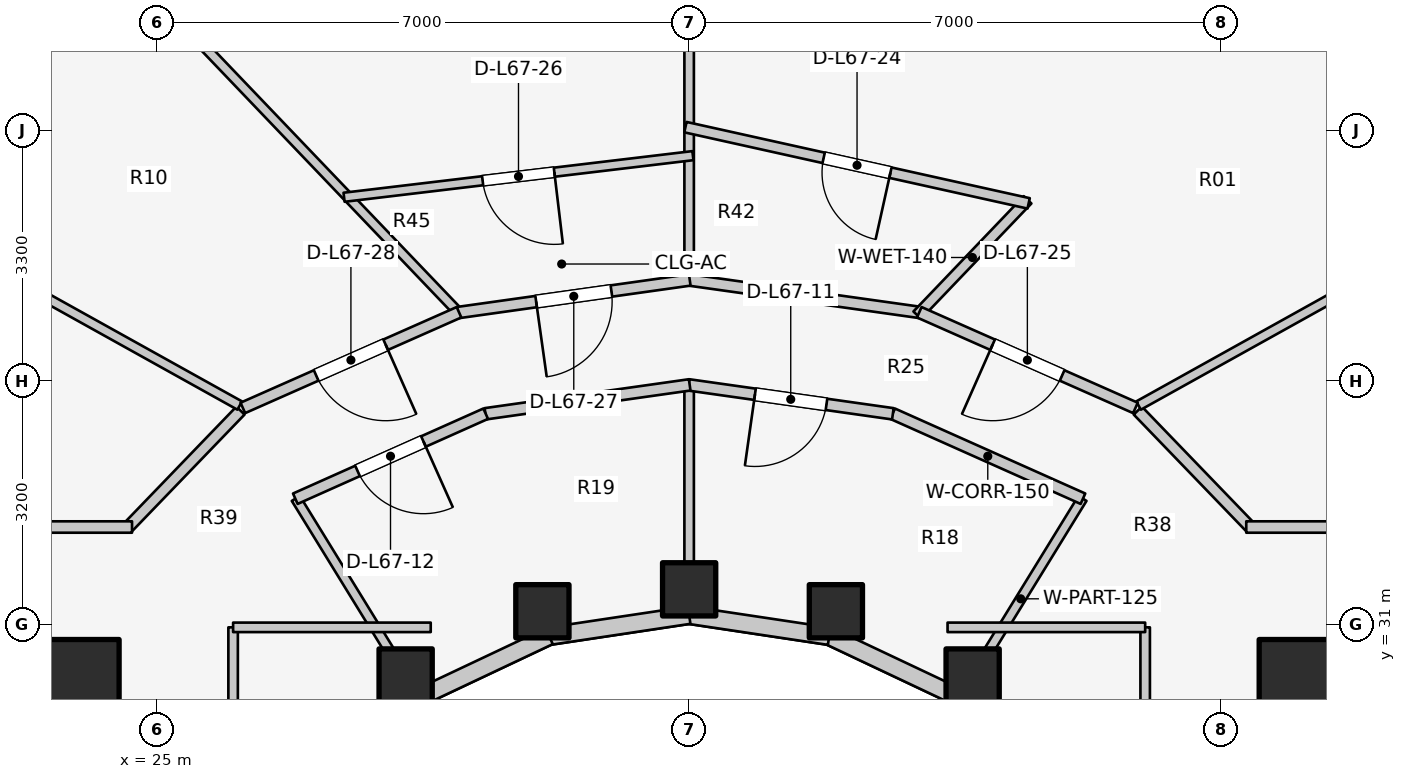
"""IFC4 building model, lengths in metres.
Left out: names, types, materials, properties, quantities, classifications, styles, units other than length and angle.
Written with IfcOpenShell. Run it as: python <this file> out.ifc"""

import sys

from ifc_helpers import new_model, si_unit, direction, frame, frame_2d, origin, origin_2d, place, context, subcontext, project, spatial, rectangle, extrude, element, fill, save


model = new_model("IFC4")
c1 = context("Model", 3, precision=1e-05, world=origin(), true_north=direction((0.0, 1.0)))
c2 = subcontext(c1, "Body", "Model", "MODEL_VIEW")
j1 = project(units=[si_unit("LENGTHUNIT", "METRE"), si_unit("PLANEANGLEUNIT", "RADIAN")], contexts=[c1])
p1 = place(None, origin())
s1 = spatial("IfcSite", under=j1, at=p1, CompositionType="ELEMENT")
p2 = place(p1, origin())
s2 = spatial("IfcBuilding", under=s1, at=p2, CompositionType="ELEMENT")
p3 = place(p2, frame((0.0, 0.0, 220.2)))
s3 = spatial("IfcBuildingStorey", under=s2, at=p3, CompositionType="ELEMENT", Elevation=220.2)
for number, where, z_axis, x_axis in (
    (1, (19.65, 30.35, 0.0), (0.0, 0.0, 1.0), (1.0, 0.0, 0.0)),
    (2, (39.85, 30.35, 0.0), (0.0, 0.0, 1.0), (1.0, 0.0, 0.0)),
):
    element("IfcWall", number, at=place(p3, frame(where, z_axis=z_axis, x_axis=x_axis)), inside=s3, PredefinedType="SHEAR", context=c2, shape_type="SweptSolid", body=[
        extrude(rectangle(XDim=4.5, YDim=0.55, at=frame_2d((2.25, 0.0))), origin(), (0.0, 0.0, 1.0), 3.1),
    ])
for number, where, z_axis, x_axis in (
    (3, (23.9, 30.2, 0.0), (0.0, 0.0, 1.0), (1.0, 0.0, 0.0)),
    (4, (40.1, 30.2, 0.0), (0.0, 0.0, 1.0), (1.0, 0.0, 0.0)),
):
    element("IfcColumn", number, at=place(p3, frame(where, z_axis=z_axis, x_axis=x_axis)), inside=s3, PredefinedType="COLUMN", context=c2, shape_type="SweptSolid", body=[
        extrude(rectangle(XDim=1.2, YDim=1.2, at=origin_2d()), origin(), (0.0, 0.0, 1.0), 3.1),
    ])
for number, where, z_axis, x_axis in (
    (5, (35.73, 30.327, 0.0), (0.0, 0.0, 1.0), (1.0, 0.0, 0.0)),
    (6, (33.931, 31.172, 0.0), (0.0, 0.0, 1.0), (1.0, 0.0, 0.0)),
    (7, (32.0, 31.46, 0.0), (0.0, 0.0, 1.0), (1.0, 0.0, 0.0)),
    (8, (30.069, 31.172, 0.0), (0.0, 0.0, 1.0), (1.0, 0.0, 0.0)),
    (9, (28.27, 30.327, 0.0), (0.0, 0.0, 1.0), (1.0, 0.0, 0.0)),
):
    element("IfcColumn", number, at=place(p3, frame(where, z_axis=z_axis, x_axis=x_axis)), inside=s3, PredefinedType="COLUMN", context=c2, shape_type="SweptSolid", body=[
        extrude(rectangle(XDim=0.7, YDim=0.7, at=origin_2d()), origin(), (0.0, 0.0, 1.0), 3.1),
    ])
p4 = place(p3, frame((37.035, 28.742, 0.0), z_axis=(0.0, 0.0, 1.0), x_axis=(-0.752576694707, 0.658504607869, 0.0)))
e10 = element("IfcWall", 10, at=p4, inside=s3, PredefinedType="STANDARD", context=c2, shape_type="SweptSolid", body=[
    extrude(rectangle(XDim=1.959, YDim=0.23, at=frame_2d((0.98, 0.0))), origin(), (0.0, 0.0, 1.0), 2.16),
])
p5 = place(p3, frame((35.56, 30.032, 0.0), z_axis=(0.0, 0.0, 1.0), x_axis=(-0.904179699603, 0.427152280606, 0.0)))
e11 = element("IfcWall", 11, at=p5, inside=s3, PredefinedType="STANDARD", context=c2, shape_type="SweptSolid", body=[
    extrude(rectangle(XDim=1.899, YDim=0.23, at=frame_2d((0.95, 0.0))), origin(), (0.0, 0.0, 1.0), 2.16),
])
for number, where, z_axis, x_axis in (
    (12, (33.843, 30.843, 0.0), (0.0, 0.0, 1.0), (-0.989, 0.149, 0.0)),
    (13, (32.0, 31.12, 0.0), (0.0, 0.0, 1.0), (-0.989, -0.149, 0.0)),
):
    element("IfcWall", number, at=place(p3, frame(where, z_axis=z_axis, x_axis=x_axis)), inside=s3, PredefinedType="STANDARD", context=c2, shape_type="SweptSolid", body=[
        extrude(rectangle(XDim=1.864, YDim=0.23, at=frame_2d((0.932, 0.0))), origin(), (0.0, 0.0, 1.0), 2.16),
    ])
p6 = place(p3, frame((30.157, 30.843, 0.0), z_axis=(0.0, 0.0, 1.0), x_axis=(-0.904179699603, -0.427152280606, 0.0)))
e14 = element("IfcWall", 14, at=p6, inside=s3, PredefinedType="STANDARD", context=c2, shape_type="SweptSolid", body=[
    extrude(rectangle(XDim=1.899, YDim=0.23, at=frame_2d((0.95, 0.0))), origin(), (0.0, 0.0, 1.0), 2.16),
])
p7 = place(p3, frame((28.44, 30.032, 0.0), z_axis=(0.0, 0.0, 1.0), x_axis=(-0.752576694707, -0.658504607869, 0.0)))
e15 = element("IfcWall", 15, at=p7, inside=s3, PredefinedType="STANDARD", context=c2, shape_type="SweptSolid", body=[
    extrude(rectangle(XDim=1.959, YDim=0.23, at=frame_2d((0.98, 0.0))), origin(), (0.0, 0.0, 1.0), 2.16),
])
p8 = place(p3, frame((43.87, 37.733, 0.0), z_axis=(0.0, 0.0, 1.0), x_axis=(-0.911427484938, 0.411460738952, 0.0)))
e16 = element("IfcWall", 16, at=p8, inside=s3, PredefinedType="STANDARD", context=c2, shape_type="SweptSolid", body=[
    extrude(rectangle(XDim=5.296, YDim=0.26, at=frame_2d((2.648, 0.0))), origin(), (0.0, 0.0, 1.0), 2.85),
])
p9 = place(p8, frame((1.898, 0.0, 0.75)))
e17 = element("IfcOpeningElement", 17, at=p9, cuts=e16, PredefinedType="OPENING", context=c2, shape_type="SweptSolid", body=[
    extrude(rectangle(XDim=1.5, YDim=1.6, at=frame_2d((0.75, 0.8))), frame((0.0, 0.14, 0.0), z_axis=(0.0, -1.0, 0.0), x_axis=(1.0, 0.0, 0.0)), (0.0, 0.0, 1.0), 0.28),
])
p10 = place(p3, frame((24.957, 39.912, 0.0), z_axis=(0.0, 0.0, 1.0), x_axis=(-0.911427484938, -0.411460738952, 0.0)))
e18 = element("IfcWall", 18, at=p10, inside=s3, PredefinedType="STANDARD", context=c2, shape_type="SweptSolid", body=[
    extrude(rectangle(XDim=5.296, YDim=0.26, at=frame_2d((2.648, 0.0))), origin(), (0.0, 0.0, 1.0), 2.85),
])
p11 = place(p10, frame((1.898, 0.0, 0.75)))
e19 = element("IfcOpeningElement", 19, at=p11, cuts=e18, PredefinedType="OPENING", context=c2, shape_type="SweptSolid", body=[
    extrude(rectangle(XDim=1.5, YDim=1.6, at=frame_2d((0.75, 0.8))), frame((0.0, 0.14, 0.0), z_axis=(0.0, -1.0, 0.0), x_axis=(1.0, 0.0, 0.0)), (0.0, 0.0, 1.0), 0.28),
])
p12 = place(p3, frame((35.55, 30.015, 0.0), z_axis=(0.0, 0.0, 1.0), x_axis=(0.523992004803, 0.851723182086, 0.0)))
e20 = element("IfcWall", 20, at=p12, inside=s3, PredefinedType="PARTITIONING", context=c2, shape_type="SweptSolid", body=[
    extrude(rectangle(XDim=3.101, YDim=0.125, at=frame_2d((1.551, 0.0))), origin(), (0.0, 0.0, 1.0), 2.376),
])
p13 = place(p3, frame((32.0, 31.1, 0.0), z_axis=(0.0, 0.0, 1.0), x_axis=(0.0, 1.0, 0.0)))
e21 = element("IfcWall", 21, at=p13, inside=s3, PredefinedType="PARTITIONING", context=c2, shape_type="SweptSolid", body=[
    extrude(rectangle(XDim=3.05, YDim=0.125, at=frame_2d((1.525, 0.0))), origin(), (0.0, 0.0, 1.0), 2.376),
])
p14 = place(p3, frame((28.45, 30.015, 0.0), z_axis=(0.0, 0.0, 1.0), x_axis=(-0.523992004803, 0.851723182086, 0.0)))
e22 = element("IfcWall", 22, at=p14, inside=s3, PredefinedType="PARTITIONING", context=c2, shape_type="SweptSolid", body=[
    extrude(rectangle(XDim=3.101, YDim=0.125, at=frame_2d((1.551, 0.0))), origin(), (0.0, 0.0, 1.0), 2.376),
])
p15 = place(p3, frame((37.181, 32.652, 0.0), z_axis=(0.0, 0.0, 1.0), x_axis=(-0.913120130558, 0.407690602257, 0.0)))
e23 = element("IfcWall", 23, at=p15, inside=s3, PredefinedType="PARTITIONING", context=c2, shape_type="SweptSolid", body=[
    extrude(rectangle(XDim=2.743, YDim=0.15, at=frame_2d((1.371, 0.0))), origin(), (0.0, 0.0, 1.0), 2.376),
])
p16 = place(p3, frame((34.68, 33.77, 0.0), z_axis=(0.0, 0.0, 1.0), x_axis=(-0.990132151456, 0.140136799779, 0.0)))
e24 = element("IfcWall", 24, at=p16, inside=s3, PredefinedType="PARTITIONING", context=c2, shape_type="SweptSolid", body=[
    extrude(rectangle(XDim=2.714, YDim=0.15, at=frame_2d((1.357, 0.0))), origin(), (0.0, 0.0, 1.0), 2.376),
])
p17 = place(p16, frame((0.882, 0.0, 0.0)))
e25 = element("IfcOpeningElement", 25, at=p17, cuts=e24, PredefinedType="OPENING", context=c2, shape_type="SweptSolid", body=[
    extrude(rectangle(XDim=0.95, YDim=2.1, at=frame_2d((0.475, 1.05))), frame((0.0, 0.085, 0.0), z_axis=(0.0, -1.0, 0.0), x_axis=(1.0, 0.0, 0.0)), (0.0, 0.0, 1.0), 0.17),
])
p18 = place(p3, frame((32.007, 34.15, 0.0), z_axis=(0.0, 0.0, 1.0), x_axis=(-0.990132151456, -0.140136799779, 0.0)))
e26 = element("IfcWall", 26, at=p18, inside=s3, PredefinedType="PARTITIONING", context=c2, shape_type="SweptSolid", body=[
    extrude(rectangle(XDim=2.714, YDim=0.15, at=frame_2d((1.357, 0.0))), origin(), (0.0, 0.0, 1.0), 2.376),
])
p19 = place(p3, frame((29.323, 33.771, 0.0), z_axis=(0.0, 0.0, 1.0), x_axis=(-0.913120130558, -0.407690602257, 0.0)))
e27 = element("IfcWall", 27, at=p19, inside=s3, PredefinedType="PARTITIONING", context=c2, shape_type="SweptSolid", body=[
    extrude(rectangle(XDim=2.743, YDim=0.15, at=frame_2d((1.371, 0.0))), origin(), (0.0, 0.0, 1.0), 2.376),
])
p20 = place(p19, frame((0.896, 0.0, 0.0)))
e28 = element("IfcOpeningElement", 28, at=p20, cuts=e27, PredefinedType="OPENING", context=c2, shape_type="SweptSolid", body=[
    extrude(rectangle(XDim=0.95, YDim=2.1, at=frame_2d((0.475, 1.05))), frame((0.0, 0.085, 0.0), z_axis=(0.0, -1.0, 0.0), x_axis=(1.0, 0.0, 0.0)), (0.0, 0.0, 1.0), 0.17),
])
p21 = place(p3, frame((26.0, 25.8, 0.0), z_axis=(0.0, 0.0, 1.0), x_axis=(0.0, 1.0, 0.0)))
e29 = element("IfcWall", 29, at=p21, inside=s3, PredefinedType="PARTITIONING", context=c2, shape_type="SweptSolid", body=[
    extrude(rectangle(XDim=5.16, YDim=0.125, at=frame_2d((2.58, 0.0))), origin(), (0.0, 0.0, 1.0), 2.232),
])
p22 = place(p3, frame((26.0, 30.96, 0.0), z_axis=(0.0, 0.0, 1.0), x_axis=(1.0, 0.0, 0.0)))
e30 = element("IfcWall", 30, at=p22, inside=s3, PredefinedType="PARTITIONING", context=c2, shape_type="SweptSolid", body=[
    extrude(rectangle(XDim=2.6, YDim=0.125, at=frame_2d((1.3, 0.0))), origin(), (0.0, 0.0, 1.0), 2.376),
])
p23 = place(p3, frame((38.0, 25.8, 0.0), z_axis=(0.0, 0.0, 1.0), x_axis=(0.0, 1.0, 0.0)))
e31 = element("IfcWall", 31, at=p23, inside=s3, PredefinedType="PARTITIONING", context=c2, shape_type="SweptSolid", body=[
    extrude(rectangle(XDim=5.16, YDim=0.125, at=frame_2d((2.58, 0.0))), origin(), (0.0, 0.0, 1.0), 2.232),
])
p24 = place(p3, frame((35.4, 30.96, 0.0), z_axis=(0.0, 0.0, 1.0), x_axis=(1.0, 0.0, 0.0)))
e32 = element("IfcWall", 32, at=p24, inside=s3, PredefinedType="PARTITIONING", context=c2, shape_type="SweptSolid", body=[
    extrude(rectangle(XDim=2.6, YDim=0.125, at=frame_2d((1.3, 0.0))), origin(), (0.0, 0.0, 1.0), 2.376),
])
p25 = place(p3, frame((37.903, 33.812, 0.0), z_axis=(0.0, 0.0, 1.0), x_axis=(0.694032962553, -0.719943224768, 0.0)))
e33 = element("IfcWall", 33, at=p25, inside=s3, PredefinedType="PARTITIONING", context=c2, shape_type="SweptSolid", body=[
    extrude(rectangle(XDim=2.158, YDim=0.15, at=frame_2d((1.079, 0.0))), origin(), (0.0, 0.0, 1.0), 2.376),
])
p26 = place(p3, frame((39.33, 32.28, 0.0), z_axis=(0.0, 0.0, 1.0), x_axis=(1.0, 0.0, 0.0)))
e34 = element("IfcWall", 34, at=p26, inside=s3, PredefinedType="PARTITIONING", context=c2, shape_type="SweptSolid", body=[
    extrude(rectangle(XDim=7.52, YDim=0.15, at=frame_2d((3.76, 0.0))), origin(), (0.0, 0.0, 1.0), 2.376),
])
p27 = place(p26, frame((5.22, 0.0, 0.0)))
e35 = element("IfcOpeningElement", 35, at=p27, cuts=e34, PredefinedType="OPENING", context=c2, shape_type="SweptSolid", body=[
    extrude(rectangle(XDim=0.9, YDim=2.1, at=frame_2d((0.45, 1.05))), frame((0.0, 0.085, 0.0), z_axis=(0.0, -1.0, 0.0), x_axis=(1.0, 0.0, 0.0)), (0.0, 0.0, 1.0), 0.17),
])
p28 = place(p3, frame((26.097, 33.812, 0.0), z_axis=(0.0, 0.0, 1.0), x_axis=(-0.694032962553, -0.719943224768, 0.0)))
e36 = element("IfcWall", 36, at=p28, inside=s3, PredefinedType="PARTITIONING", context=c2, shape_type="SweptSolid", body=[
    extrude(rectangle(XDim=2.158, YDim=0.15, at=frame_2d((1.079, 0.0))), origin(), (0.0, 0.0, 1.0), 2.376),
])
p29 = place(p3, frame((17.15, 32.28, 0.0), z_axis=(0.0, 0.0, 1.0), x_axis=(1.0, 0.0, 0.0)))
e37 = element("IfcWall", 37, at=p29, inside=s3, PredefinedType="PARTITIONING", context=c2, shape_type="SweptSolid", body=[
    extrude(rectangle(XDim=7.52, YDim=0.15, at=frame_2d((3.76, 0.0))), origin(), (0.0, 0.0, 1.0), 2.376),
])
p30 = place(p29, frame((1.3, 0.0, 0.0)))
e38 = element("IfcOpeningElement", 38, at=p30, cuts=e37, PredefinedType="OPENING", context=c2, shape_type="SweptSolid", body=[
    extrude(rectangle(XDim=0.9, YDim=2.1, at=frame_2d((0.45, 1.05))), frame((0.0, 0.085, 0.0), z_axis=(0.0, -1.0, 0.0), x_axis=(1.0, 0.0, 0.0)), (0.0, 0.0, 1.0), 0.17),
])
p31 = place(p3, frame((37.913, 33.878, 0.0), z_axis=(0.0, 0.0, 1.0), x_axis=(0.87377679808, 0.486327160599, 0.0)))
e39 = element("IfcWall", 39, at=p31, inside=s3, PredefinedType="PARTITIONING", context=c2, shape_type="SweptSolid", body=[
    extrude(rectangle(XDim=6.24, YDim=0.125, at=frame_2d((3.12, 0.0))), origin(), (0.0, 0.0, 1.0), 2.376),
])
p32 = place(p3, frame((32.0, 35.585, 0.0), z_axis=(0.0, 0.0, 1.0), x_axis=(0.0, 1.0, 0.0)))
e40 = element("IfcWall", 40, at=p32, inside=s3, PredefinedType="PARTITIONING", context=c2, shape_type="SweptSolid", body=[
    extrude(rectangle(XDim=4.115, YDim=0.125, at=frame_2d((2.058, 0.0))), origin(), (0.0, 0.0, 1.0), 2.376),
])
p33 = place(p3, frame((28.926, 35.143, 0.0), z_axis=(0.0, 0.0, 1.0), x_axis=(-0.691128003726, 0.722732372642, 0.0)))
e41 = element("IfcWall", 41, at=p33, inside=s3, PredefinedType="PARTITIONING", context=c2, shape_type="SweptSolid", body=[
    extrude(rectangle(XDim=5.33, YDim=0.125, at=frame_2d((2.665, 0.0))), origin(), (0.0, 0.0, 1.0), 2.376),
])
p34 = place(p3, frame((26.087, 33.878, 0.0), z_axis=(0.0, 0.0, 1.0), x_axis=(-0.87377679808, 0.486327160599, 0.0)))
e42 = element("IfcWall", 42, at=p34, inside=s3, PredefinedType="PARTITIONING", context=c2, shape_type="SweptSolid", body=[
    extrude(rectangle(XDim=6.24, YDim=0.125, at=frame_2d((3.12, 0.0))), origin(), (0.0, 0.0, 1.0), 2.376),
])
p35 = place(p3, frame((35.085, 35.096, 0.0), z_axis=(0.0, 0.0, 1.0), x_axis=(-0.990254086283, 0.139272555084, 0.0)))
e43 = element("IfcWall", 43, at=p35, inside=s3, PredefinedType="PARTITIONING", context=c2, shape_type="SweptSolid", body=[
    extrude(rectangle(XDim=3.166, YDim=0.15, at=frame_2d((1.583, 0.0))), origin(), (0.0, 0.0, 1.0), 2.376),
])
p36 = place(p3, frame((35.001, 35.067, 0.0), z_axis=(0.0, 0.0, 1.0), x_axis=(0.691180416361, 0.722682248321, 0.0)))
e44 = element("IfcWall", 44, at=p36, inside=s3, PredefinedType="PLUMBINGWALL", context=c2, shape_type="SweptSolid", body=[
    extrude(rectangle(XDim=2.1, YDim=0.14, at=frame_2d((1.05, 0.0))), origin(), (0.0, 0.0, 1.0), 2.385),
])
p37 = place(p3, frame((36.467, 36.538, 0.0), z_axis=(0.0, 0.0, 1.0), x_axis=(-0.976214372251, 0.21680751696, 0.0)))
e45 = element("IfcWall", 45, at=p37, inside=s3, PredefinedType="PLUMBINGWALL", context=c2, shape_type="SweptSolid", body=[
    extrude(rectangle(XDim=4.626, YDim=0.14, at=frame_2d((2.313, 0.0))), origin(), (0.0, 0.0, 1.0), 2.376),
])
p38 = place(p37, frame((1.863, 0.0, 0.0)))
e46 = element("IfcOpeningElement", 46, at=p38, cuts=e45, PredefinedType="OPENING", context=c2, shape_type="SweptSolid", body=[
    extrude(rectangle(XDim=0.9, YDim=2.1, at=frame_2d((0.45, 1.05))), frame((0.0, 0.08, 0.0), z_axis=(0.0, -1.0, 0.0), x_axis=(1.0, 0.0, 0.0)), (0.0, 0.0, 1.0), 0.16),
])
p39 = place(p3, frame((37.872, 33.847, 0.0), z_axis=(0.0, 0.0, 1.0), x_axis=(-0.914490094652, 0.40460828808, 0.0)))
e47 = element("IfcWall", 47, at=p39, inside=s3, PredefinedType="PARTITIONING", context=c2, shape_type="SweptSolid", body=[
    extrude(rectangle(XDim=3.11, YDim=0.15, at=frame_2d((1.555, 0.0))), origin(), (0.0, 0.0, 1.0), 2.376),
])
p40 = place(p39, frame((1.055, 0.0, 0.0)))
e48 = element("IfcOpeningElement", 48, at=p40, cuts=e47, PredefinedType="OPENING", context=c2, shape_type="SweptSolid", body=[
    extrude(rectangle(XDim=1.0, YDim=2.1, at=frame_2d((0.5, 1.05))), frame((0.0, 0.085, 0.0), z_axis=(0.0, -1.0, 0.0), x_axis=(1.0, 0.0, 0.0)), (0.0, 0.0, 1.0), 0.17),
])
p41 = place(p3, frame((32.05, 37.166, 0.0), z_axis=(0.0, 0.0, 1.0), x_axis=(-0.992963303559, -0.118422454736, 0.0)))
e49 = element("IfcWall", 49, at=p41, inside=s3, PredefinedType="MOVABLE", context=c2, shape_type="SweptSolid", body=[
    extrude(rectangle(XDim=4.622, YDim=0.12, at=frame_2d((2.311, 0.0))), origin(), (0.0, 0.0, 1.0), 2.376),
])
p42 = place(p41, frame((1.836, 0.0, 0.0)))
e50 = element("IfcOpeningElement", 50, at=p42, cuts=e49, PredefinedType="OPENING", context=c2, shape_type="SweptSolid", body=[
    extrude(rectangle(XDim=0.95, YDim=2.1, at=frame_2d((0.475, 1.05))), frame((0.0, 0.07, 0.0), z_axis=(0.0, -1.0, 0.0), x_axis=(1.0, 0.0, 0.0)), (0.0, 0.0, 1.0), 0.14),
])
p43 = place(p3, frame((32.008, 35.53, 0.0), z_axis=(0.0, 0.0, 1.0), x_axis=(-0.990257602807, -0.139247549651, 0.0)))
e51 = element("IfcWall", 51, at=p43, inside=s3, PredefinedType="PARTITIONING", context=c2, shape_type="SweptSolid", body=[
    extrude(rectangle(XDim=3.082, YDim=0.15, at=frame_2d((1.541, 0.0))), origin(), (0.0, 0.0, 1.0), 2.376),
])
p44 = place(p43, frame((1.041, 0.0, 0.0)))
e52 = element("IfcOpeningElement", 52, at=p44, cuts=e51, PredefinedType="OPENING", context=c2, shape_type="SweptSolid", body=[
    extrude(rectangle(XDim=1.0, YDim=2.1, at=frame_2d((0.5, 1.05))), frame((0.0, 0.085, 0.0), z_axis=(0.0, -1.0, 0.0), x_axis=(1.0, 0.0, 0.0)), (0.0, 0.0, 1.0), 0.17),
])
p45 = place(p3, frame((28.972, 35.105, 0.0), z_axis=(0.0, 0.0, 1.0), x_axis=(-0.914490094652, -0.40460828808, 0.0)))
e53 = element("IfcWall", 53, at=p45, inside=s3, PredefinedType="PARTITIONING", context=c2, shape_type="SweptSolid", body=[
    extrude(rectangle(XDim=3.11, YDim=0.15, at=frame_2d((1.555, 0.0))), origin(), (0.0, 0.0, 1.0), 2.376),
])
p46 = place(p45, frame((1.055, 0.0, 0.0)))
e54 = element("IfcOpeningElement", 54, at=p46, cuts=e53, PredefinedType="OPENING", context=c2, shape_type="SweptSolid", body=[
    extrude(rectangle(XDim=1.0, YDim=2.1, at=frame_2d((0.5, 1.05))), frame((0.0, 0.085, 0.0), z_axis=(0.0, -1.0, 0.0), x_axis=(1.0, 0.0, 0.0)), (0.0, 0.0, 1.0), 0.17),
])
p47 = place(p17, origin())
e55 = element("IfcDoor", 55, at=p47, inside=s3, OperationType="SINGLE_SWING_RIGHT", PredefinedType="DOOR", context=c2, shape_type="SweptSolid", body=[
    extrude(rectangle(XDim=0.95, YDim=2.1, at=frame_2d((0.475, 1.05))), frame((0.0, 0.025, 0.0), z_axis=(0.0, -1.0, 0.0), x_axis=(1.0, 0.0, 0.0)), (0.0, 0.0, 1.0), 0.05),
])
fill(e25, e55)
p48 = place(p20, origin())
e56 = element("IfcDoor", 56, at=p48, inside=s3, OperationType="SINGLE_SWING_LEFT", PredefinedType="DOOR", context=c2, shape_type="SweptSolid", body=[
    extrude(rectangle(XDim=0.95, YDim=2.1, at=frame_2d((0.475, 1.05))), frame((0.0, 0.025, 0.0), z_axis=(0.0, -1.0, 0.0), x_axis=(1.0, 0.0, 0.0)), (0.0, 0.0, 1.0), 0.05),
])
fill(e28, e56)
p49 = place(p38, origin())
e57 = element("IfcDoor", 57, at=p49, inside=s3, OperationType="SINGLE_SWING_LEFT", PredefinedType="DOOR", context=c2, shape_type="SweptSolid", body=[
    extrude(rectangle(XDim=0.9, YDim=2.1, at=frame_2d((0.45, 1.05))), frame((0.0, 0.025, 0.0), z_axis=(0.0, -1.0, 0.0), x_axis=(1.0, 0.0, 0.0)), (0.0, 0.0, 1.0), 0.05),
])
fill(e46, e57)
p50 = place(p40, origin())
e58 = element("IfcDoor", 58, at=p50, inside=s3, OperationType="SINGLE_SWING_RIGHT", PredefinedType="DOOR", context=c2, shape_type="SweptSolid", body=[
    extrude(rectangle(XDim=1.0, YDim=2.1, at=frame_2d((0.5, 1.05))), frame((0.0, 0.025, 0.0), z_axis=(0.0, -1.0, 0.0), x_axis=(1.0, 0.0, 0.0)), (0.0, 0.0, 1.0), 0.05),
])
fill(e48, e58)
p51 = place(p42, origin())
e59 = element("IfcDoor", 59, at=p51, inside=s3, OperationType="SINGLE_SWING_LEFT", PredefinedType="DOOR", context=c2, shape_type="SweptSolid", body=[
    extrude(rectangle(XDim=0.95, YDim=2.1, at=frame_2d((0.475, 1.05))), frame((0.0, 0.025, 0.0), z_axis=(0.0, -1.0, 0.0), x_axis=(1.0, 0.0, 0.0)), (0.0, 0.0, 1.0), 0.05),
])
fill(e50, e59)
p52 = place(p44, origin())
e60 = element("IfcDoor", 60, at=p52, inside=s3, OperationType="SINGLE_SWING_RIGHT", PredefinedType="DOOR", context=c2, shape_type="SweptSolid", body=[
    extrude(rectangle(XDim=1.0, YDim=2.1, at=frame_2d((0.5, 1.05))), frame((0.0, 0.025, 0.0), z_axis=(0.0, -1.0, 0.0), x_axis=(1.0, 0.0, 0.0)), (0.0, 0.0, 1.0), 0.05),
])
fill(e52, e60)
p53 = place(p46, origin())
e61 = element("IfcDoor", 61, at=p53, inside=s3, OperationType="SINGLE_SWING_LEFT", PredefinedType="DOOR", context=c2, shape_type="SweptSolid", body=[
    extrude(rectangle(XDim=1.0, YDim=2.1, at=frame_2d((0.5, 1.05))), frame((0.0, 0.025, 0.0), z_axis=(0.0, -1.0, 0.0), x_axis=(1.0, 0.0, 0.0)), (0.0, 0.0, 1.0), 0.05),
])
fill(e54, e61)
save(model, sys.argv[1])
